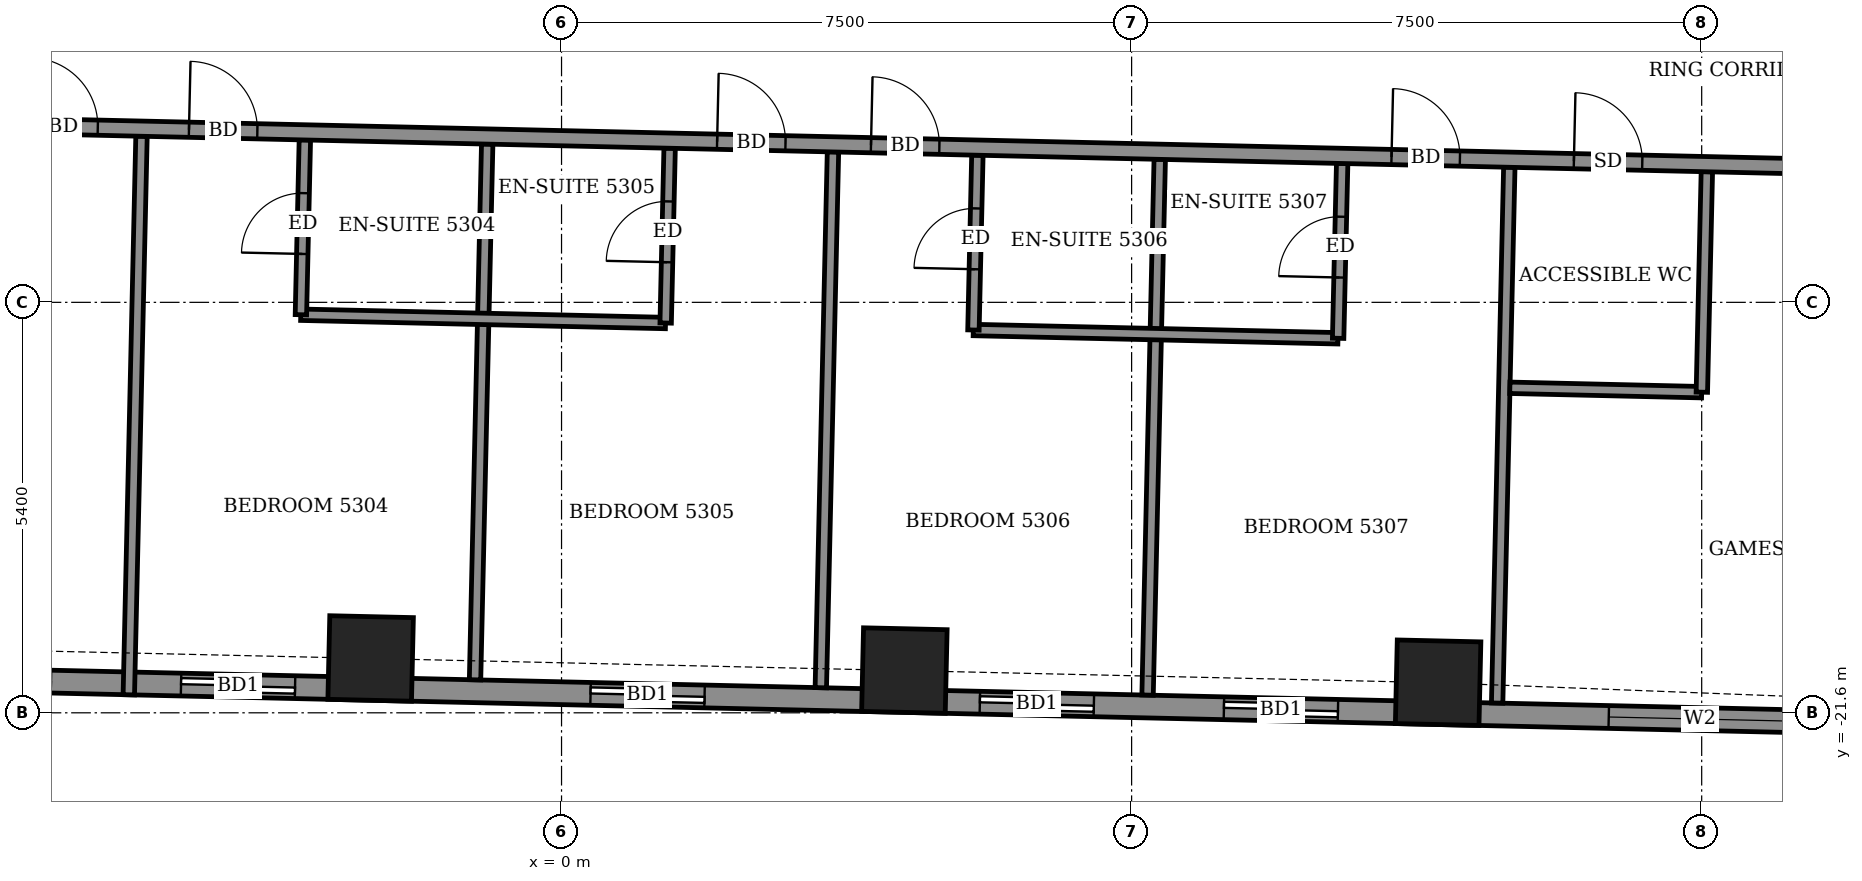
"""IFC4 building model, lengths in metres.
Left out: names, types, materials, properties, quantities, classifications, styles, units other than length and angle.
Written with IfcOpenShell. Run it as: python <this file> out.ifc"""

import sys

from ifc_helpers import new_model, si_unit, direction, frame, frame_2d, origin, origin_2d, place, context, subcontext, project, spatial, rectangle, extrude, element, fill, save


model = new_model("IFC4")
c1 = context("Model", 3, precision=1e-05, world=origin(), true_north=direction((0.0, 1.0)))
c2 = subcontext(c1, "Body", "Model", "MODEL_VIEW")
j1 = project(units=[si_unit("LENGTHUNIT", "METRE"), si_unit("PLANEANGLEUNIT", "RADIAN")], contexts=[c1])
p1 = place(None, origin())
s1 = spatial("IfcSite", under=j1, at=p1, CompositionType="ELEMENT")
p2 = place(p1, origin())
s2 = spatial("IfcBuilding", under=s1, at=p2, CompositionType="ELEMENT")
p3 = place(p2, frame((0.0, 0.0, 208.7)))
s3 = spatial("IfcBuildingStorey", under=s2, at=p3, CompositionType="ELEMENT", Elevation=208.7)
for number, where, z_axis, x_axis in (
    (1, (-2.511, -20.885, -0.55), (0.0, 0.0, 1.0), (1.0, -0.023, 0.0)),
    (2, (4.51, -21.044, -0.55), (0.0, 0.0, 1.0), (1.0, -0.023, 0.0)),
    (3, (11.532, -21.204, -0.55), (0.0, 0.0, 1.0), (1.0, -0.023, 0.0)),
):
    element("IfcColumn", number, at=place(p3, frame(where, z_axis=z_axis, x_axis=x_axis)), inside=s3, PredefinedType="COLUMN", context=c2, shape_type="SweptSolid", body=[
        extrude(rectangle(XDim=1.1, YDim=1.1, at=origin_2d()), origin(), (0.0, 0.0, 1.0), 3.6),
    ])
p4 = place(p3, frame((-23.437, -20.81, 0.0), z_axis=(0.0, 0.0, 1.0), x_axis=(0.999742269115, -0.022702320244, 0.0)))
e4 = element("IfcWall", 4, at=p4, inside=s3, PredefinedType="SOLIDWALL", context=c2, shape_type="SweptSolid", body=[
    extrude(rectangle(XDim=41.844, YDim=0.3, at=frame_2d((20.922, 0.0))), origin(), (0.0, 0.0, 1.0), 2.55),
])
p5 = place(p4, frame((1.825, 0.0, 0.0)))
e5 = element("IfcOpeningElement", 5, at=p5, cuts=e4, PredefinedType="OPENING", context=c2, shape_type="SweptSolid", body=[
    extrude(rectangle(XDim=1.5, YDim=2.4, at=frame_2d((0.75, 1.2))), frame((0.0, 0.16, 0.0), z_axis=(0.0, -1.0, 0.0), x_axis=(1.0, 0.0, 0.0)), (0.0, 0.0, 1.0), 0.32),
])
p6 = place(p4, frame((4.937, 0.0, 0.0)))
e6 = element("IfcOpeningElement", 6, at=p6, cuts=e4, PredefinedType="OPENING", context=c2, shape_type="SweptSolid", body=[
    extrude(rectangle(XDim=1.2, YDim=2.4, at=frame_2d((0.6, 1.2))), frame((0.0, 0.16, 0.0), z_axis=(0.0, -1.0, 0.0), x_axis=(1.0, 0.0, 0.0)), (0.0, 0.0, 1.0), 0.32),
])
p7 = place(p4, frame((10.3, 0.0, 0.0)))
e7 = element("IfcOpeningElement", 7, at=p7, cuts=e4, PredefinedType="OPENING", context=c2, shape_type="SweptSolid", body=[
    extrude(rectangle(XDim=1.5, YDim=2.4, at=frame_2d((0.75, 1.2))), frame((0.0, 0.16, 0.0), z_axis=(0.0, -1.0, 0.0), x_axis=(1.0, 0.0, 0.0)), (0.0, 0.0, 1.0), 0.32),
])
p8 = place(p4, frame((15.224, 0.0, 0.0)))
e8 = element("IfcOpeningElement", 8, at=p8, cuts=e4, PredefinedType="OPENING", context=c2, shape_type="SweptSolid", body=[
    extrude(rectangle(XDim=1.5, YDim=2.4, at=frame_2d((0.75, 1.2))), frame((0.0, 0.16, 0.0), z_axis=(0.0, -1.0, 0.0), x_axis=(1.0, 0.0, 0.0)), (0.0, 0.0, 1.0), 0.32),
])
p9 = place(p4, frame((18.436, 0.0, 0.0)))
e9 = element("IfcOpeningElement", 9, at=p9, cuts=e4, PredefinedType="OPENING", context=c2, shape_type="SweptSolid", body=[
    extrude(rectangle(XDim=1.5, YDim=2.4, at=frame_2d((0.75, 1.2))), frame((0.0, 0.16, 0.0), z_axis=(0.0, -1.0, 0.0), x_axis=(1.0, 0.0, 0.0)), (0.0, 0.0, 1.0), 0.32),
])
p10 = place(p4, frame((23.825, 0.0, 0.0)))
e10 = element("IfcOpeningElement", 10, at=p10, cuts=e4, PredefinedType="OPENING", context=c2, shape_type="SweptSolid", body=[
    extrude(rectangle(XDim=1.5, YDim=2.4, at=frame_2d((0.75, 1.2))), frame((0.0, 0.16, 0.0), z_axis=(0.0, -1.0, 0.0), x_axis=(1.0, 0.0, 0.0)), (0.0, 0.0, 1.0), 0.32),
])
p11 = place(p4, frame((28.948, 0.0, 0.0)))
e11 = element("IfcOpeningElement", 11, at=p11, cuts=e4, PredefinedType="OPENING", context=c2, shape_type="SweptSolid", body=[
    extrude(rectangle(XDim=1.5, YDim=2.4, at=frame_2d((0.75, 1.2))), frame((0.0, 0.16, 0.0), z_axis=(0.0, -1.0, 0.0), x_axis=(1.0, 0.0, 0.0)), (0.0, 0.0, 1.0), 0.32),
])
p12 = place(p4, frame((32.16, 0.0, 0.0)))
e12 = element("IfcOpeningElement", 12, at=p12, cuts=e4, PredefinedType="OPENING", context=c2, shape_type="SweptSolid", body=[
    extrude(rectangle(XDim=1.5, YDim=2.4, at=frame_2d((0.75, 1.2))), frame((0.0, 0.16, 0.0), z_axis=(0.0, -1.0, 0.0), x_axis=(1.0, 0.0, 0.0)), (0.0, 0.0, 1.0), 0.32),
])
p13 = place(p4, frame((37.224, 0.0, 0.9)))
e13 = element("IfcOpeningElement", 13, at=p13, cuts=e4, PredefinedType="OPENING", context=c2, shape_type="SweptSolid", body=[
    extrude(rectangle(XDim=2.4, YDim=1.5, at=frame_2d((1.2, 0.75))), frame((0.0, 0.16, 0.0), z_axis=(0.0, -1.0, 0.0), x_axis=(1.0, 0.0, 0.0)), (0.0, 0.0, 1.0), 0.32),
])
p14 = place(p3, frame((-5.693, -21.363, 0.0), z_axis=(0.0, 0.0, 1.0), x_axis=(0.022753095343, 0.999741114815, 0.0)))
e14 = element("IfcWall", 14, at=p14, inside=s3, PredefinedType="PARTITIONING", context=c2, shape_type="SweptSolid", body=[
    extrude(rectangle(XDim=7.35, YDim=0.15, at=frame_2d((3.675, 0.0))), origin(), (0.0, 0.0, 1.0), 2.55),
])
p15 = place(p3, frame((-1.138, -21.166, 0.0), z_axis=(0.0, 0.0, 1.0), x_axis=(0.022682859663, 0.99974271084, 0.0)))
e15 = element("IfcWall", 15, at=p15, inside=s3, PredefinedType="PARTITIONING", context=c2, shape_type="SweptSolid", body=[
    extrude(rectangle(XDim=7.05, YDim=0.15, at=frame_2d((3.525, 0.0))), origin(), (0.0, 0.0, 1.0), 2.55),
])
p16 = place(p3, frame((3.411, -21.27, 0.0), z_axis=(0.0, 0.0, 1.0), x_axis=(0.022714326521, 0.999741996402, 0.0)))
e16 = element("IfcWall", 16, at=p16, inside=s3, PredefinedType="PARTITIONING", context=c2, shape_type="SweptSolid", body=[
    extrude(rectangle(XDim=7.051, YDim=0.15, at=frame_2d((3.525, 0.0))), origin(), (0.0, 0.0, 1.0), 2.55),
])
p17 = place(p3, frame((7.71, -21.367, 0.0), z_axis=(0.0, 0.0, 1.0), x_axis=(0.022718258661, 0.999741907056, 0.0)))
e17 = element("IfcWall", 17, at=p17, inside=s3, PredefinedType="PARTITIONING", context=c2, shape_type="SweptSolid", body=[
    extrude(rectangle(XDim=7.05, YDim=0.15, at=frame_2d((3.525, 0.0))), origin(), (0.0, 0.0, 1.0), 2.55),
])
p18 = place(p3, frame((12.309, -21.472, 0.0), z_axis=(0.0, 0.0, 1.0), x_axis=(0.022680503969, 0.999742764285, 0.0)))
e18 = element("IfcWall", 18, at=p18, inside=s3, PredefinedType="PARTITIONING", context=c2, shape_type="SweptSolid", body=[
    extrude(rectangle(XDim=7.051, YDim=0.15, at=frame_2d((3.525, 0.0))), origin(), (0.0, 0.0, 1.0), 2.55),
])
p19 = place(p3, frame((12.476, -17.324, 0.0), z_axis=(0.0, 0.0, 1.0), x_axis=(0.999735102249, -0.023015762656, 0.0)))
e19 = element("IfcWall", 19, at=p19, inside=s3, PredefinedType="PARTITIONING", context=c2, shape_type="SweptSolid", body=[
    extrude(rectangle(XDim=2.525, YDim=0.15, at=frame_2d((1.262, 0.0))), origin(), (0.0, 0.0, 1.0), 3.05),
])
p20 = place(p3, frame((15.002, -17.382, 0.0), z_axis=(0.0, 0.0, 1.0), x_axis=(0.022807433839, 0.999739876649, 0.0)))
e20 = element("IfcWall", 20, at=p20, inside=s3, PredefinedType="PARTITIONING", context=c2, shape_type="SweptSolid", body=[
    extrude(rectangle(XDim=2.901, YDim=0.15, at=frame_2d((1.45, 0.0))), origin(), (0.0, 0.0, 1.0), 3.05),
])
p21 = place(p3, frame((-3.431, -16.363, 0.0), z_axis=(0.0, 0.0, 1.0), x_axis=(0.999742675121, -0.022684433919, 0.0)))
e21 = element("IfcWall", 21, at=p21, inside=s3, PredefinedType="PARTITIONING", context=c2, shape_type="SweptSolid", body=[
    extrude(rectangle(XDim=4.8, YDim=0.15, at=frame_2d((2.4, 0.0))), origin(), (0.0, 0.0, 1.0), 3.05),
])
p22 = place(p3, frame((-3.429, -16.363, 0.0), z_axis=(0.0, 0.0, 1.0), x_axis=(0.022612884682, 0.999744296031, 0.0)))
e22 = element("IfcWall", 22, at=p22, inside=s3, PredefinedType="PARTITIONING", context=c2, shape_type="SweptSolid", body=[
    extrude(rectangle(XDim=2.3, YDim=0.15, at=frame_2d((1.15, 0.0))), origin(), (0.0, 0.0, 1.0), 3.05),
])
p23 = place(p22, frame((0.8, 0.0, 0.0)))
e23 = element("IfcOpeningElement", 23, at=p23, cuts=e22, PredefinedType="OPENING", context=c2, shape_type="SweptSolid", body=[
    extrude(rectangle(XDim=0.8, YDim=2.1, at=frame_2d((0.4, 1.05))), frame((0.0, 0.085, 0.0), z_axis=(0.0, -1.0, 0.0), x_axis=(1.0, 0.0, 0.0)), (0.0, 0.0, 1.0), 0.17),
])
p24 = place(p3, frame((1.37, -16.472, 0.0), z_axis=(0.0, 0.0, 1.0), x_axis=(0.022615284993, 0.999744241736, 0.0)))
e24 = element("IfcWall", 24, at=p24, inside=s3, PredefinedType="PARTITIONING", context=c2, shape_type="SweptSolid", body=[
    extrude(rectangle(XDim=2.299, YDim=0.15, at=frame_2d((1.15, 0.0))), origin(), (0.0, 0.0, 1.0), 3.05),
])
p25 = place(p24, frame((0.8, 0.0, 0.0)))
e25 = element("IfcOpeningElement", 25, at=p25, cuts=e24, PredefinedType="OPENING", context=c2, shape_type="SweptSolid", body=[
    extrude(rectangle(XDim=0.8, YDim=2.1, at=frame_2d((0.4, 1.05))), frame((0.0, 0.085, 0.0), z_axis=(0.0, -1.0, 0.0), x_axis=(1.0, 0.0, 0.0)), (0.0, 0.0, 1.0), 0.17),
])
p26 = place(p3, frame((5.417, -16.564, 0.0), z_axis=(0.0, 0.0, 1.0), x_axis=(0.999741441463, -0.022738738327, 0.0)))
e26 = element("IfcWall", 26, at=p26, inside=s3, PredefinedType="PARTITIONING", context=c2, shape_type="SweptSolid", body=[
    extrude(rectangle(XDim=4.799, YDim=0.15, at=frame_2d((2.4, 0.0))), origin(), (0.0, 0.0, 1.0), 3.05),
])
p27 = place(p3, frame((5.419, -16.564, 0.0), z_axis=(0.0, 0.0, 1.0), x_axis=(0.022612884682, 0.999744296031, 0.0)))
e27 = element("IfcWall", 27, at=p27, inside=s3, PredefinedType="PARTITIONING", context=c2, shape_type="SweptSolid", body=[
    extrude(rectangle(XDim=2.3, YDim=0.15, at=frame_2d((1.15, 0.0))), origin(), (0.0, 0.0, 1.0), 3.05),
])
p28 = place(p27, frame((0.8, 0.0, 0.0)))
e28 = element("IfcOpeningElement", 28, at=p28, cuts=e27, PredefinedType="OPENING", context=c2, shape_type="SweptSolid", body=[
    extrude(rectangle(XDim=0.8, YDim=2.1, at=frame_2d((0.4, 1.05))), frame((0.0, 0.085, 0.0), z_axis=(0.0, -1.0, 0.0), x_axis=(1.0, 0.0, 0.0)), (0.0, 0.0, 1.0), 0.17),
])
p29 = place(p3, frame((10.217, -16.673, 0.0), z_axis=(0.0, 0.0, 1.0), x_axis=(0.023027540424, 0.999734831034, 0.0)))
e29 = element("IfcWall", 29, at=p29, inside=s3, PredefinedType="PARTITIONING", context=c2, shape_type="SweptSolid", body=[
    extrude(rectangle(XDim=2.301, YDim=0.15, at=frame_2d((1.15, 0.0))), origin(), (0.0, 0.0, 1.0), 3.05),
])
p30 = place(p29, frame((0.8, 0.0, 0.0)))
e30 = element("IfcOpeningElement", 30, at=p30, cuts=e29, PredefinedType="OPENING", context=c2, shape_type="SweptSolid", body=[
    extrude(rectangle(XDim=0.8, YDim=2.1, at=frame_2d((0.4, 1.05))), frame((0.0, 0.085, 0.0), z_axis=(0.0, -1.0, 0.0), x_axis=(1.0, 0.0, 0.0)), (0.0, 0.0, 1.0), 0.17),
])
p31 = place(p3, frame((-26.421, -13.441, 0.0), z_axis=(0.0, 0.0, 1.0), x_axis=(0.999742754064, -0.022680954485, 0.0)))
e31 = element("IfcWall", 31, at=p31, inside=s3, PredefinedType="PARTITIONING", context=c2, shape_type="SweptSolid", body=[
    extrude(rectangle(XDim=48.945, YDim=0.2, at=frame_2d((24.472, 0.0))), origin(), (0.0, 0.0, 1.0), 3.05),
])
p32 = place(p31, frame((1.425, 0.0, 0.0)))
e32 = element("IfcOpeningElement", 32, at=p32, cuts=e31, PredefinedType="OPENING", context=c2, shape_type="SweptSolid", body=[
    extrude(rectangle(XDim=1.0, YDim=2.1, at=frame_2d((0.5, 1.05))), frame((0.0, 0.11, 0.0), z_axis=(0.0, -1.0, 0.0), x_axis=(1.0, 0.0, 0.0)), (0.0, 0.0, 1.0), 0.22),
])
p33 = place(p31, frame((6.0, 0.0, 0.0)))
e33 = element("IfcOpeningElement", 33, at=p33, cuts=e31, PredefinedType="OPENING", context=c2, shape_type="SweptSolid", body=[
    extrude(rectangle(XDim=0.9, YDim=2.1, at=frame_2d((0.45, 1.05))), frame((0.0, 0.11, 0.0), z_axis=(0.0, -1.0, 0.0), x_axis=(1.0, 0.0, 0.0)), (0.0, 0.0, 1.0), 0.22),
])
p34 = place(p31, frame((10.55, 0.0, 0.0)))
e34 = element("IfcOpeningElement", 34, at=p34, cuts=e31, PredefinedType="OPENING", context=c2, shape_type="SweptSolid", body=[
    extrude(rectangle(XDim=0.9, YDim=2.1, at=frame_2d((0.45, 1.05))), frame((0.0, 0.11, 0.0), z_axis=(0.0, -1.0, 0.0), x_axis=(1.0, 0.0, 0.0)), (0.0, 0.0, 1.0), 0.22),
])
p35 = place(p31, frame((12.55, 0.0, 0.0)))
e35 = element("IfcOpeningElement", 35, at=p35, cuts=e31, PredefinedType="OPENING", context=c2, shape_type="SweptSolid", body=[
    extrude(rectangle(XDim=0.9, YDim=2.1, at=frame_2d((0.45, 1.05))), frame((0.0, 0.11, 0.0), z_axis=(0.0, -1.0, 0.0), x_axis=(1.0, 0.0, 0.0)), (0.0, 0.0, 1.0), 0.22),
])
p36 = place(p31, frame((19.425, 0.0, 0.0)))
e36 = element("IfcOpeningElement", 36, at=p36, cuts=e31, PredefinedType="OPENING", context=c2, shape_type="SweptSolid", body=[
    extrude(rectangle(XDim=0.9, YDim=2.1, at=frame_2d((0.45, 1.05))), frame((0.0, 0.11, 0.0), z_axis=(0.0, -1.0, 0.0), x_axis=(1.0, 0.0, 0.0)), (0.0, 0.0, 1.0), 0.22),
])
p37 = place(p31, frame((21.525, 0.0, 0.0)))
e37 = element("IfcOpeningElement", 37, at=p37, cuts=e31, PredefinedType="OPENING", context=c2, shape_type="SweptSolid", body=[
    extrude(rectangle(XDim=0.9, YDim=2.1, at=frame_2d((0.45, 1.05))), frame((0.0, 0.11, 0.0), z_axis=(0.0, -1.0, 0.0), x_axis=(1.0, 0.0, 0.0)), (0.0, 0.0, 1.0), 0.22),
])
p38 = place(p31, frame((28.475, 0.0, 0.0)))
e38 = element("IfcOpeningElement", 38, at=p38, cuts=e31, PredefinedType="OPENING", context=c2, shape_type="SweptSolid", body=[
    extrude(rectangle(XDim=0.9, YDim=2.1, at=frame_2d((0.45, 1.05))), frame((0.0, 0.11, 0.0), z_axis=(0.0, -1.0, 0.0), x_axis=(1.0, 0.0, 0.0)), (0.0, 0.0, 1.0), 0.22),
])
p39 = place(p31, frame((30.5, 0.0, 0.0)))
e39 = element("IfcOpeningElement", 39, at=p39, cuts=e31, PredefinedType="OPENING", context=c2, shape_type="SweptSolid", body=[
    extrude(rectangle(XDim=0.9, YDim=2.1, at=frame_2d((0.45, 1.05))), frame((0.0, 0.11, 0.0), z_axis=(0.0, -1.0, 0.0), x_axis=(1.0, 0.0, 0.0)), (0.0, 0.0, 1.0), 0.22),
])
p40 = place(p31, frame((37.35, 0.0, 0.0)))
e40 = element("IfcOpeningElement", 40, at=p40, cuts=e31, PredefinedType="OPENING", context=c2, shape_type="SweptSolid", body=[
    extrude(rectangle(XDim=0.9, YDim=2.1, at=frame_2d((0.45, 1.05))), frame((0.0, 0.11, 0.0), z_axis=(0.0, -1.0, 0.0), x_axis=(1.0, 0.0, 0.0)), (0.0, 0.0, 1.0), 0.22),
])
p41 = place(p31, frame((45.422, 0.0, 0.0)))
e41 = element("IfcOpeningElement", 41, at=p41, cuts=e31, PredefinedType="OPENING", context=c2, shape_type="SweptSolid", body=[
    extrude(rectangle(XDim=1.0, YDim=2.1, at=frame_2d((0.5, 1.05))), frame((0.0, 0.11, 0.0), z_axis=(0.0, -1.0, 0.0), x_axis=(1.0, 0.0, 0.0)), (0.0, 0.0, 1.0), 0.22),
])
p42 = place(p31, frame((39.75, 0.0, 0.0)))
e42 = element("IfcOpeningElement", 42, at=p42, cuts=e31, PredefinedType="OPENING", context=c2, shape_type="SweptSolid", body=[
    extrude(rectangle(XDim=0.9, YDim=2.1, at=frame_2d((0.45, 1.05))), frame((0.0, 0.11, 0.0), z_axis=(0.0, -1.0, 0.0), x_axis=(1.0, 0.0, 0.0)), (0.0, 0.0, 1.0), 0.22),
])
p43 = place(p9, origin())
e43 = element("IfcDoor", 43, at=p43, inside=s3, OperationType="SLIDING_TO_LEFT", PredefinedType="DOOR", context=c2, shape_type="SweptSolid", body=[
    extrude(rectangle(XDim=1.5, YDim=2.4, at=frame_2d((0.75, 1.2))), frame((0.0, 0.025, 0.0), z_axis=(0.0, -1.0, 0.0), x_axis=(1.0, 0.0, 0.0)), (0.0, 0.0, 1.0), 0.05),
])
fill(e9, e43)
p44 = place(p10, origin())
e44 = element("IfcDoor", 44, at=p44, inside=s3, OperationType="SLIDING_TO_LEFT", PredefinedType="DOOR", context=c2, shape_type="SweptSolid", body=[
    extrude(rectangle(XDim=1.5, YDim=2.4, at=frame_2d((0.75, 1.2))), frame((0.0, 0.025, 0.0), z_axis=(0.0, -1.0, 0.0), x_axis=(1.0, 0.0, 0.0)), (0.0, 0.0, 1.0), 0.05),
])
fill(e10, e44)
p45 = place(p11, origin())
e45 = element("IfcDoor", 45, at=p45, inside=s3, OperationType="SLIDING_TO_LEFT", PredefinedType="DOOR", context=c2, shape_type="SweptSolid", body=[
    extrude(rectangle(XDim=1.5, YDim=2.4, at=frame_2d((0.75, 1.2))), frame((0.0, 0.025, 0.0), z_axis=(0.0, -1.0, 0.0), x_axis=(1.0, 0.0, 0.0)), (0.0, 0.0, 1.0), 0.05),
])
fill(e11, e45)
p46 = place(p12, origin())
e46 = element("IfcDoor", 46, at=p46, inside=s3, OperationType="SLIDING_TO_LEFT", PredefinedType="DOOR", context=c2, shape_type="SweptSolid", body=[
    extrude(rectangle(XDim=1.5, YDim=2.4, at=frame_2d((0.75, 1.2))), frame((0.0, 0.025, 0.0), z_axis=(0.0, -1.0, 0.0), x_axis=(1.0, 0.0, 0.0)), (0.0, 0.0, 1.0), 0.05),
])
fill(e12, e46)
p47 = place(p13, origin())
e47 = element("IfcWindow", 47, at=p47, inside=s3, PartitioningType="DOUBLE_PANEL_VERTICAL", PredefinedType="WINDOW", context=c2, shape_type="SweptSolid", body=[
    extrude(rectangle(XDim=2.4, YDim=1.5, at=frame_2d((1.2, 0.75))), frame((0.0, 0.03, 0.0), z_axis=(0.0, -1.0, 0.0), x_axis=(1.0, 0.0, 0.0)), (0.0, 0.0, 1.0), 0.06),
])
fill(e13, e47)
p48 = place(p36, origin())
e48 = element("IfcDoor", 48, at=p48, inside=s3, OperationType="SINGLE_SWING_LEFT", PredefinedType="DOOR", context=c2, shape_type="SweptSolid", body=[
    extrude(rectangle(XDim=0.9, YDim=2.1, at=frame_2d((0.45, 1.05))), frame((0.0, 0.025, 0.0), z_axis=(0.0, -1.0, 0.0), x_axis=(1.0, 0.0, 0.0)), (0.0, 0.0, 1.0), 0.05),
])
fill(e36, e48)
p49 = place(p37, origin())
e49 = element("IfcDoor", 49, at=p49, inside=s3, OperationType="SINGLE_SWING_RIGHT", PredefinedType="DOOR", context=c2, shape_type="SweptSolid", body=[
    extrude(rectangle(XDim=0.9, YDim=2.1, at=frame_2d((0.45, 1.05))), frame((0.0, 0.025, 0.0), z_axis=(0.0, -1.0, 0.0), x_axis=(1.0, 0.0, 0.0)), (0.0, 0.0, 1.0), 0.05),
])
fill(e37, e49)
p50 = place(p23, origin())
e50 = element("IfcDoor", 50, at=p50, inside=s3, OperationType="SINGLE_SWING_RIGHT", PredefinedType="DOOR", context=c2, shape_type="SweptSolid", body=[
    extrude(rectangle(XDim=0.8, YDim=2.1, at=frame_2d((0.4, 1.05))), frame((0.0, 0.025, 0.0), z_axis=(0.0, -1.0, 0.0), x_axis=(1.0, 0.0, 0.0)), (0.0, 0.0, 1.0), 0.05),
])
fill(e23, e50)
p51 = place(p38, origin())
e51 = element("IfcDoor", 51, at=p51, inside=s3, OperationType="SINGLE_SWING_LEFT", PredefinedType="DOOR", context=c2, shape_type="SweptSolid", body=[
    extrude(rectangle(XDim=0.9, YDim=2.1, at=frame_2d((0.45, 1.05))), frame((0.0, 0.025, 0.0), z_axis=(0.0, -1.0, 0.0), x_axis=(1.0, 0.0, 0.0)), (0.0, 0.0, 1.0), 0.05),
])
fill(e38, e51)
p52 = place(p25, origin())
e52 = element("IfcDoor", 52, at=p52, inside=s3, OperationType="SINGLE_SWING_LEFT", PredefinedType="DOOR", context=c2, shape_type="SweptSolid", body=[
    extrude(rectangle(XDim=0.8, YDim=2.1, at=frame_2d((0.4, 1.05))), frame((0.0, 0.025, 0.0), z_axis=(0.0, -1.0, 0.0), x_axis=(1.0, 0.0, 0.0)), (0.0, 0.0, 1.0), 0.05),
])
fill(e25, e52)
p53 = place(p39, origin())
e53 = element("IfcDoor", 53, at=p53, inside=s3, OperationType="SINGLE_SWING_RIGHT", PredefinedType="DOOR", context=c2, shape_type="SweptSolid", body=[
    extrude(rectangle(XDim=0.9, YDim=2.1, at=frame_2d((0.45, 1.05))), frame((0.0, 0.025, 0.0), z_axis=(0.0, -1.0, 0.0), x_axis=(1.0, 0.0, 0.0)), (0.0, 0.0, 1.0), 0.05),
])
fill(e39, e53)
p54 = place(p28, origin())
e54 = element("IfcDoor", 54, at=p54, inside=s3, OperationType="SINGLE_SWING_RIGHT", PredefinedType="DOOR", context=c2, shape_type="SweptSolid", body=[
    extrude(rectangle(XDim=0.8, YDim=2.1, at=frame_2d((0.4, 1.05))), frame((0.0, 0.025, 0.0), z_axis=(0.0, -1.0, 0.0), x_axis=(1.0, 0.0, 0.0)), (0.0, 0.0, 1.0), 0.05),
])
fill(e28, e54)
p55 = place(p40, origin())
e55 = element("IfcDoor", 55, at=p55, inside=s3, OperationType="SINGLE_SWING_LEFT", PredefinedType="DOOR", context=c2, shape_type="SweptSolid", body=[
    extrude(rectangle(XDim=0.9, YDim=2.1, at=frame_2d((0.45, 1.05))), frame((0.0, 0.025, 0.0), z_axis=(0.0, -1.0, 0.0), x_axis=(1.0, 0.0, 0.0)), (0.0, 0.0, 1.0), 0.05),
])
fill(e40, e55)
p56 = place(p30, origin())
e56 = element("IfcDoor", 56, at=p56, inside=s3, OperationType="SINGLE_SWING_LEFT", PredefinedType="DOOR", context=c2, shape_type="SweptSolid", body=[
    extrude(rectangle(XDim=0.8, YDim=2.1, at=frame_2d((0.4, 1.05))), frame((0.0, 0.025, 0.0), z_axis=(0.0, -1.0, 0.0), x_axis=(1.0, 0.0, 0.0)), (0.0, 0.0, 1.0), 0.05),
])
fill(e30, e56)
p57 = place(p42, origin())
e57 = element("IfcDoor", 57, at=p57, inside=s3, OperationType="SINGLE_SWING_RIGHT", PredefinedType="DOOR", context=c2, shape_type="SweptSolid", body=[
    extrude(rectangle(XDim=0.9, YDim=2.1, at=frame_2d((0.45, 1.05))), frame((0.0, 0.025, 0.0), z_axis=(0.0, -1.0, 0.0), x_axis=(1.0, 0.0, 0.0)), (0.0, 0.0, 1.0), 0.05),
])
fill(e42, e57)
save(model, sys.argv[1])
